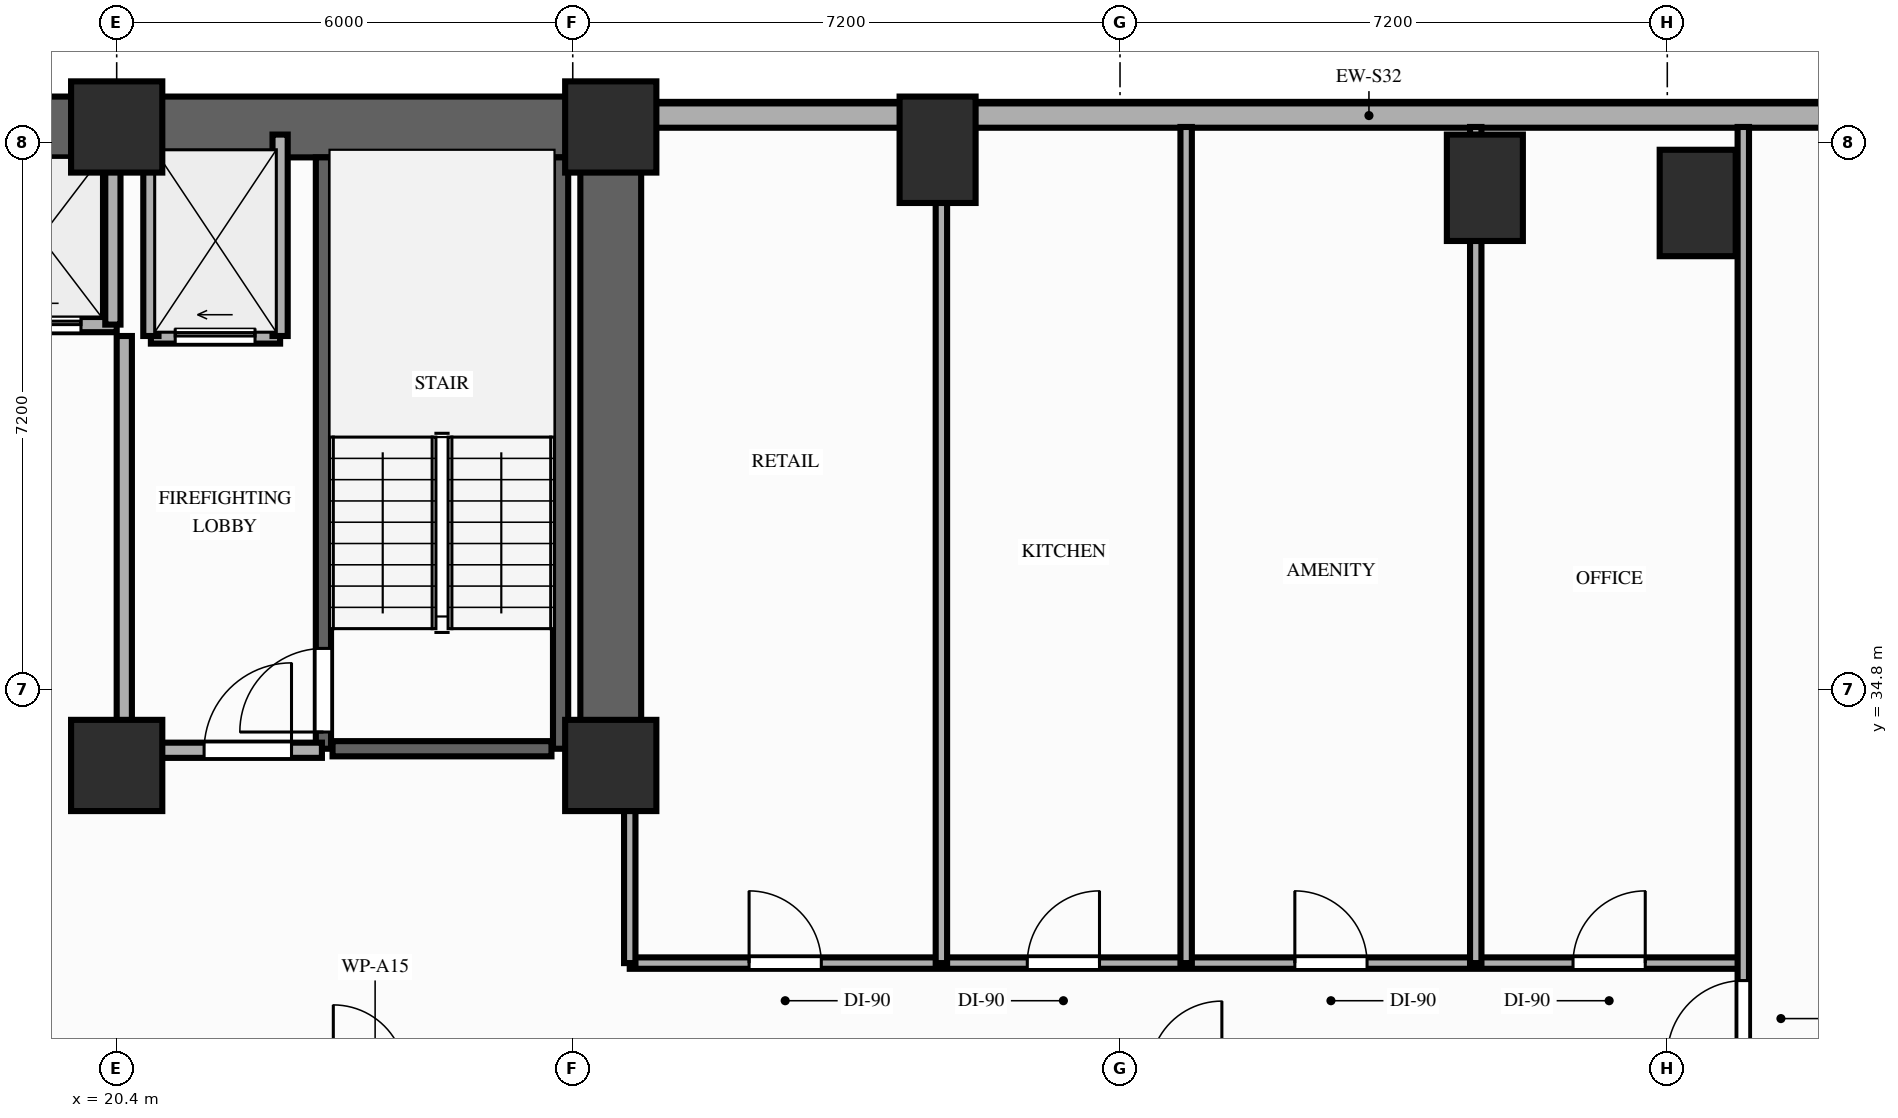
"""IFC4 building model, lengths in metres.
Left out: names, types, materials, properties, quantities, classifications, styles, units other than length and angle.
Written with IfcOpenShell. Run it as: python <this file> out.ifc"""

import sys

from ifc_helpers import new_model, si_unit, direction, frame, frame_2d, origin, origin_2d, place, context, subcontext, project, spatial, rectangle, extrude, element, fill, save


model = new_model("IFC4")
c1 = context("Model", 3, precision=1e-05, world=origin(), true_north=direction((0.0, 1.0)))
c2 = subcontext(c1, "Body", "Model", "MODEL_VIEW")
j1 = project(units=[si_unit("LENGTHUNIT", "METRE"), si_unit("PLANEANGLEUNIT", "RADIAN")], contexts=[c1])
p1 = place(None, origin())
s1 = spatial("IfcSite", under=j1, at=p1, CompositionType="ELEMENT")
p2 = place(p1, origin())
s2 = spatial("IfcBuilding", under=s1, at=p2, CompositionType="ELEMENT")
p3 = place(p2, frame((0.0, 0.0, 56.4)))
s3 = spatial("IfcBuildingStorey", under=s2, at=p3, CompositionType="ELEMENT", Elevation=56.4)
for number, where, z_axis, x_axis in (
    (1, (20.4, 33.8, 0.0), (0.0, 0.0, 1.0), (1.0, 0.0, 0.0)),
    (2, (26.9, 33.8, 0.0), (0.0, 0.0, 1.0), (1.0, 0.0, 0.0)),
    (3, (20.4, 42.2, 0.0), (0.0, 0.0, 1.0), (1.0, 0.0, 0.0)),
    (4, (26.9, 42.2, 0.0), (0.0, 0.0, 1.0), (1.0, 0.0, 0.0)),
):
    element("IfcColumn", number, at=place(p3, frame(where, z_axis=z_axis, x_axis=x_axis)), inside=s3, PredefinedType="COLUMN", context=c2, shape_type="SweptSolid", body=[
        extrude(rectangle(XDim=1.2, YDim=1.2, at=origin_2d()), origin(), (0.0, 0.0, 1.0), 3.2),
    ])
for number, where, z_axis, x_axis in (
    (5, (31.2, 41.9, 0.0), (0.0, 0.0, 1.0), (1.0, 0.0, 0.0)),
    (6, (38.4, 41.4, 0.0), (0.0, 0.0, 1.0), (1.0, 0.0, 0.0)),
    (7, (41.2, 41.2, 0.0), (0.0, 0.0, 1.0), (1.0, 0.0, 0.0)),
):
    element("IfcColumn", number, at=place(p3, frame(where, z_axis=z_axis, x_axis=x_axis)), inside=s3, PredefinedType="COLUMN", context=c2, shape_type="SweptSolid", body=[
        extrude(rectangle(XDim=1.0, YDim=1.4, at=origin_2d()), origin(), (0.0, 0.0, 1.0), 3.2),
    ])
p4 = place(p3, frame((46.4, 42.35, 0.0), z_axis=(0.0, 0.0, 1.0), x_axis=(-1.0, 0.0, 0.0)))
e8 = element("IfcWall", 8, at=p4, inside=s3, PredefinedType="STANDARD", context=c2, shape_type="SweptSolid", body=[
    extrude(rectangle(XDim=19.05, YDim=0.32, at=frame_2d((9.525, 0.0))), origin(), (0.0, 0.0, 1.0), 2.4),
])
p5 = place(p3, frame((6.45, 42.2, 0.0), z_axis=(0.0, 0.0, 1.0), x_axis=(1.0, 0.0, 0.0)))
e9 = element("IfcWall", 9, at=p5, inside=s3, PredefinedType="SHEAR", context=c2, shape_type="SweptSolid", body=[
    extrude(rectangle(XDim=20.45, YDim=0.8, at=frame_2d((10.225, 0.0))), origin(), (0.0, 0.0, 1.0), 3.02),
])
p6 = place(p3, frame((26.9, 33.8, 0.0), z_axis=(0.0, 0.0, 1.0), x_axis=(0.0, 1.0, 0.0)))
e10 = element("IfcWall", 10, at=p6, inside=s3, PredefinedType="SHEAR", context=c2, shape_type="SweptSolid", body=[
    extrude(rectangle(XDim=7.95, YDim=0.8, at=frame_2d((3.975, 0.0))), origin(), (0.0, 0.0, 1.0), 3.02),
])
p7 = place(p3, frame((23.12, 34.02, 0.0), z_axis=(0.0, 0.0, 1.0), x_axis=(0.0, 1.0, 0.0)))
e11 = element("IfcWall", 11, at=p7, inside=s3, PredefinedType="SHEAR", context=c2, shape_type="SweptSolid", body=[
    extrude(rectangle(XDim=7.78, YDim=0.2, at=frame_2d((3.89, 0.0))), origin(), (0.0, 0.0, 1.0), 3.02),
])
p8 = place(p7, frame((0.22, 0.0, 0.0)))
e12 = element("IfcOpeningElement", 12, at=p8, cuts=e11, PredefinedType="OPENING", context=c2, shape_type="SweptSolid", body=[
    extrude(rectangle(XDim=1.1, YDim=2.15, at=frame_2d((0.55, 1.075))), frame((0.0, 0.11, 0.0), z_axis=(0.0, -1.0, 0.0), x_axis=(1.0, 0.0, 0.0)), (0.0, 0.0, 1.0), 0.22),
])
p9 = place(p3, frame((26.24, 34.02, 0.0), z_axis=(0.0, 0.0, 1.0), x_axis=(0.0, 1.0, 0.0)))
e13 = element("IfcWall", 13, at=p9, inside=s3, PredefinedType="SHEAR", context=c2, shape_type="SweptSolid", body=[
    extrude(rectangle(XDim=7.78, YDim=0.2, at=frame_2d((3.89, 0.0))), origin(), (0.0, 0.0, 1.0), 3.02),
])
p10 = place(p3, frame((23.24, 34.02, 0.0), z_axis=(0.0, 0.0, 1.0), x_axis=(1.0, 0.0, 0.0)))
e14 = element("IfcWall", 14, at=p10, inside=s3, PredefinedType="SHEAR", context=c2, shape_type="SweptSolid", body=[
    extrude(rectangle(XDim=2.88, YDim=0.2, at=frame_2d((1.44, 0.0))), origin(), (0.0, 0.0, 1.0), 3.02),
])
p11 = place(p3, frame((20.85, 39.45, 0.0), z_axis=(0.0, 0.0, 1.0), x_axis=(1.0, 0.0, 0.0)))
e15 = element("IfcWall", 15, at=p11, inside=s3, PredefinedType="MOVABLE", context=c2, shape_type="SweptSolid", body=[
    extrude(rectangle(XDim=1.7, YDim=0.2, at=frame_2d((0.85, 0.0))), origin(), (0.0, 0.0, 1.0), 3.02),
])
p12 = place(p11, frame((0.32, 0.0, 0.0)))
e16 = element("IfcOpeningElement", 16, at=p12, cuts=e15, PredefinedType="OPENING", context=c2, shape_type="SweptSolid", body=[
    extrude(rectangle(XDim=1.05, YDim=2.15, at=frame_2d((0.525, 1.075))), frame((0.0, 0.11, 0.0), z_axis=(0.0, -1.0, 0.0), x_axis=(1.0, 0.0, 0.0)), (0.0, 0.0, 1.0), 0.22),
])
for number, where, z_axis, x_axis in (
    (17, (20.85, 39.45, 0.0), (0.0, 0.0, 1.0), (0.0, 1.0, 0.0)),
    (18, (22.55, 39.45, 0.0), (0.0, 0.0, 1.0), (0.0, 1.0, 0.0)),
):
    element("IfcWall", number, at=place(p3, frame(where, z_axis=z_axis, x_axis=x_axis)), inside=s3, PredefinedType="MOVABLE", context=c2, shape_type="SweptSolid", body=[
        extrude(rectangle(XDim=2.65, YDim=0.2, at=frame_2d((1.325, 0.0))), origin(), (0.0, 0.0, 1.0), 2.4),
    ])
p13 = place(p3, frame((20.5, 34.0, 0.0), z_axis=(0.0, 0.0, 1.0), x_axis=(0.0, 1.0, 0.0)))
e19 = element("IfcWall", 19, at=p13, inside=s3, PredefinedType="PARTITIONING", context=c2, shape_type="SweptSolid", body=[
    extrude(rectangle(XDim=5.45, YDim=0.2, at=frame_2d((2.725, 0.0))), origin(), (0.0, 0.0, 1.0), 2.4),
])
p14 = place(p3, frame((20.5, 34.0, 0.0), z_axis=(0.0, 0.0, 1.0), x_axis=(1.0, 0.0, 0.0)))
e20 = element("IfcWall", 20, at=p14, inside=s3, PredefinedType="PARTITIONING", context=c2, shape_type="SweptSolid", body=[
    extrude(rectangle(XDim=2.6, YDim=0.2, at=frame_2d((1.3, 0.0))), origin(), (0.0, 0.0, 1.0), 2.4),
])
p15 = place(p14, frame((1.05, 0.0, 0.0)))
e21 = element("IfcOpeningElement", 21, at=p15, cuts=e20, PredefinedType="OPENING", context=c2, shape_type="SweptSolid", body=[
    extrude(rectangle(XDim=1.15, YDim=2.15, at=frame_2d((0.575, 1.075))), frame((0.0, 0.11, 0.0), z_axis=(0.0, -1.0, 0.0), x_axis=(1.0, 0.0, 0.0)), (0.0, 0.0, 1.0), 0.22),
])
p16 = place(p3, frame((13.0, 39.6, 0.0), z_axis=(0.0, 0.0, 1.0), x_axis=(1.0, 0.0, 0.0)))
e22 = element("IfcWall", 22, at=p16, inside=s3, PredefinedType="MOVABLE", context=c2, shape_type="SweptSolid", body=[
    extrude(rectangle(XDim=7.4, YDim=0.2, at=frame_2d((3.7, 0.0))), origin(), (0.0, 0.0, 1.0), 3.02),
])
p17 = place(p16, frame((0.47, 0.0, 0.0)))
e23 = element("IfcOpeningElement", 23, at=p17, cuts=e22, PredefinedType="OPENING", context=c2, shape_type="SweptSolid", body=[
    extrude(rectangle(XDim=1.05, YDim=2.15, at=frame_2d((0.525, 1.075))), frame((0.0, 0.11, 0.0), z_axis=(0.0, -1.0, 0.0), x_axis=(1.0, 0.0, 0.0)), (0.0, 0.0, 1.0), 0.22),
])
p18 = place(p16, frame((2.28, 0.0, 0.0)))
e24 = element("IfcOpeningElement", 24, at=p18, cuts=e22, PredefinedType="OPENING", context=c2, shape_type="SweptSolid", body=[
    extrude(rectangle(XDim=1.05, YDim=2.15, at=frame_2d((0.525, 1.075))), frame((0.0, 0.11, 0.0), z_axis=(0.0, -1.0, 0.0), x_axis=(1.0, 0.0, 0.0)), (0.0, 0.0, 1.0), 0.22),
])
p19 = place(p16, frame((4.08, 0.0, 0.0)))
e25 = element("IfcOpeningElement", 25, at=p19, cuts=e22, PredefinedType="OPENING", context=c2, shape_type="SweptSolid", body=[
    extrude(rectangle(XDim=1.05, YDim=2.15, at=frame_2d((0.525, 1.075))), frame((0.0, 0.11, 0.0), z_axis=(0.0, -1.0, 0.0), x_axis=(1.0, 0.0, 0.0)), (0.0, 0.0, 1.0), 0.22),
])
p20 = place(p16, frame((5.88, 0.0, 0.0)))
e26 = element("IfcOpeningElement", 26, at=p20, cuts=e22, PredefinedType="OPENING", context=c2, shape_type="SweptSolid", body=[
    extrude(rectangle(XDim=1.05, YDim=2.15, at=frame_2d((0.525, 1.075))), frame((0.0, 0.11, 0.0), z_axis=(0.0, -1.0, 0.0), x_axis=(1.0, 0.0, 0.0)), (0.0, 0.0, 1.0), 0.22),
])
p21 = place(p3, frame((20.35, 39.6, 0.0), z_axis=(0.0, 0.0, 1.0), x_axis=(0.0, 1.0, 0.0)))
e27 = element("IfcWall", 27, at=p21, inside=s3, PredefinedType="MOVABLE", context=c2, shape_type="SweptSolid", body=[
    extrude(rectangle(XDim=2.18, YDim=0.2, at=frame_2d((1.09, 0.0))), origin(), (0.0, 0.0, 1.0), 3.02),
])
p22 = place(p3, frame((27.15, 31.2, 0.0), z_axis=(0.0, 0.0, 1.0), x_axis=(1.0, 0.0, 0.0)))
e28 = element("IfcWall", 28, at=p22, inside=s3, PredefinedType="PARTITIONING", context=c2, shape_type="SweptSolid", body=[
    extrude(rectangle(XDim=14.65, YDim=0.15, at=frame_2d((7.325, 0.0))), origin(), (0.0, 0.0, 1.0), 2.4),
])
p23 = place(p22, frame((1.57, 0.0, 0.0)))
e29 = element("IfcOpeningElement", 29, at=p23, cuts=e28, PredefinedType="OPENING", context=c2, shape_type="SweptSolid", body=[
    extrude(rectangle(XDim=0.95, YDim=2.15, at=frame_2d((0.475, 1.075))), frame((0.0, 0.085, 0.0), z_axis=(0.0, -1.0, 0.0), x_axis=(1.0, 0.0, 0.0)), (0.0, 0.0, 1.0), 0.17),
])
p24 = place(p22, frame((5.23, 0.0, 0.0)))
e30 = element("IfcOpeningElement", 30, at=p24, cuts=e28, PredefinedType="OPENING", context=c2, shape_type="SweptSolid", body=[
    extrude(rectangle(XDim=0.95, YDim=2.15, at=frame_2d((0.475, 1.075))), frame((0.0, 0.085, 0.0), z_axis=(0.0, -1.0, 0.0), x_axis=(1.0, 0.0, 0.0)), (0.0, 0.0, 1.0), 0.17),
])
p25 = place(p22, frame((8.75, 0.0, 0.0)))
e31 = element("IfcOpeningElement", 31, at=p25, cuts=e28, PredefinedType="OPENING", context=c2, shape_type="SweptSolid", body=[
    extrude(rectangle(XDim=0.95, YDim=2.15, at=frame_2d((0.475, 1.075))), frame((0.0, 0.085, 0.0), z_axis=(0.0, -1.0, 0.0), x_axis=(1.0, 0.0, 0.0)), (0.0, 0.0, 1.0), 0.17),
])
p26 = place(p22, frame((12.41, 0.0, 0.0)))
e32 = element("IfcOpeningElement", 32, at=p26, cuts=e28, PredefinedType="OPENING", context=c2, shape_type="SweptSolid", body=[
    extrude(rectangle(XDim=0.95, YDim=2.15, at=frame_2d((0.475, 1.075))), frame((0.0, 0.085, 0.0), z_axis=(0.0, -1.0, 0.0), x_axis=(1.0, 0.0, 0.0)), (0.0, 0.0, 1.0), 0.17),
])
p27 = place(p3, frame((27.15, 31.2, 0.0), z_axis=(0.0, 0.0, 1.0), x_axis=(0.0, 1.0, 0.0)))
e33 = element("IfcWall", 33, at=p27, inside=s3, PredefinedType="PARTITIONING", context=c2, shape_type="SweptSolid", body=[
    extrude(rectangle(XDim=2.48, YDim=0.15, at=frame_2d((1.24, 0.0))), origin(), (0.0, 0.0, 1.0), 2.4),
])
p28 = place(p3, frame((41.8, 26.75, 0.0), z_axis=(0.0, 0.0, 1.0), x_axis=(0.0, 1.0, 0.0)))
e34 = element("IfcWall", 34, at=p28, inside=s3, PredefinedType="PARTITIONING", context=c2, shape_type="SweptSolid", body=[
    extrude(rectangle(XDim=15.45, YDim=0.15, at=frame_2d((7.725, 0.0))), origin(), (0.0, 0.0, 1.0), 2.4),
])
p29 = place(p28, frame((3.22, 0.0, 0.0)))
e35 = element("IfcOpeningElement", 35, at=p29, cuts=e34, PredefinedType="OPENING", context=c2, shape_type="SweptSolid", body=[
    extrude(rectangle(XDim=1.0, YDim=2.15, at=frame_2d((0.5, 1.075))), frame((0.0, 0.085, 0.0), z_axis=(0.0, -1.0, 0.0), x_axis=(1.0, 0.0, 0.0)), (0.0, 0.0, 1.0), 0.17),
])
for number, where, z_axis, x_axis in (
    (36, (31.25, 31.2, 0.0), (0.0, 0.0, 1.0), (0.0, 1.0, 0.0)),
    (37, (34.47, 31.2, 0.0), (0.0, 0.0, 1.0), (0.0, 1.0, 0.0)),
    (38, (38.28, 31.2, 0.0), (0.0, 0.0, 1.0), (0.0, 1.0, 0.0)),
):
    element("IfcWall", number, at=place(p3, frame(where, z_axis=z_axis, x_axis=x_axis)), inside=s3, PredefinedType="PARTITIONING", context=c2, shape_type="SweptSolid", body=[
        extrude(rectangle(XDim=11.0, YDim=0.15, at=frame_2d((5.5, 0.0))), origin(), (0.0, 0.0, 1.0), 2.4),
    ])
p30 = place(p8, origin())
e39 = element("IfcDoor", 39, at=p30, inside=s3, OperationType="SINGLE_SWING_LEFT", PredefinedType="DOOR", context=c2, shape_type="SweptSolid", body=[
    extrude(rectangle(XDim=1.1, YDim=2.15, at=frame_2d((0.55, 1.075))), frame((0.0, 0.025, 0.0), z_axis=(0.0, -1.0, 0.0), x_axis=(1.0, 0.0, 0.0)), (0.0, 0.0, 1.0), 0.05),
])
fill(e12, e39)
p31 = place(p12, origin())
e40 = element("IfcDoor", 40, at=p31, inside=s3, OperationType="SLIDING_TO_LEFT", PredefinedType="DOOR", context=c2, shape_type="SweptSolid", body=[
    extrude(rectangle(XDim=1.05, YDim=2.15, at=frame_2d((0.525, 1.075))), frame((0.0, 0.025, 0.0), z_axis=(0.0, -1.0, 0.0), x_axis=(1.0, 0.0, 0.0)), (0.0, 0.0, 1.0), 0.05),
])
fill(e16, e40)
p32 = place(p15, origin())
e41 = element("IfcDoor", 41, at=p32, inside=s3, OperationType="SINGLE_SWING_RIGHT", PredefinedType="DOOR", context=c2, shape_type="SweptSolid", body=[
    extrude(rectangle(XDim=1.15, YDim=2.15, at=frame_2d((0.575, 1.075))), frame((0.0, 0.025, 0.0), z_axis=(0.0, -1.0, 0.0), x_axis=(1.0, 0.0, 0.0)), (0.0, 0.0, 1.0), 0.05),
])
fill(e21, e41)
p33 = place(p20, origin())
e42 = element("IfcDoor", 42, at=p33, inside=s3, OperationType="SLIDING_TO_LEFT", PredefinedType="DOOR", context=c2, shape_type="SweptSolid", body=[
    extrude(rectangle(XDim=1.05, YDim=2.15, at=frame_2d((0.525, 1.075))), frame((0.0, 0.025, 0.0), z_axis=(0.0, -1.0, 0.0), x_axis=(1.0, 0.0, 0.0)), (0.0, 0.0, 1.0), 0.05),
])
fill(e26, e42)
p34 = place(p29, origin())
e43 = element("IfcDoor", 43, at=p34, inside=s3, OperationType="SINGLE_SWING_LEFT", PredefinedType="DOOR", context=c2, shape_type="SweptSolid", body=[
    extrude(rectangle(XDim=1.0, YDim=2.15, at=frame_2d((0.5, 1.075))), frame((0.0, 0.025, 0.0), z_axis=(0.0, -1.0, 0.0), x_axis=(1.0, 0.0, 0.0)), (0.0, 0.0, 1.0), 0.05),
])
fill(e35, e43)
p35 = place(p23, origin())
e44 = element("IfcDoor", 44, at=p35, inside=s3, OperationType="SINGLE_SWING_LEFT", PredefinedType="DOOR", context=c2, shape_type="SweptSolid", body=[
    extrude(rectangle(XDim=0.95, YDim=2.15, at=frame_2d((0.475, 1.075))), frame((0.0, 0.025, 0.0), z_axis=(0.0, -1.0, 0.0), x_axis=(1.0, 0.0, 0.0)), (0.0, 0.0, 1.0), 0.05),
])
fill(e29, e44)
p36 = place(p24, origin())
e45 = element("IfcDoor", 45, at=p36, inside=s3, OperationType="SINGLE_SWING_RIGHT", PredefinedType="DOOR", context=c2, shape_type="SweptSolid", body=[
    extrude(rectangle(XDim=0.95, YDim=2.15, at=frame_2d((0.475, 1.075))), frame((0.0, 0.025, 0.0), z_axis=(0.0, -1.0, 0.0), x_axis=(1.0, 0.0, 0.0)), (0.0, 0.0, 1.0), 0.05),
])
fill(e30, e45)
p37 = place(p25, origin())
e46 = element("IfcDoor", 46, at=p37, inside=s3, OperationType="SINGLE_SWING_LEFT", PredefinedType="DOOR", context=c2, shape_type="SweptSolid", body=[
    extrude(rectangle(XDim=0.95, YDim=2.15, at=frame_2d((0.475, 1.075))), frame((0.0, 0.025, 0.0), z_axis=(0.0, -1.0, 0.0), x_axis=(1.0, 0.0, 0.0)), (0.0, 0.0, 1.0), 0.05),
])
fill(e31, e46)
p38 = place(p26, origin())
e47 = element("IfcDoor", 47, at=p38, inside=s3, OperationType="SINGLE_SWING_RIGHT", PredefinedType="DOOR", context=c2, shape_type="SweptSolid", body=[
    extrude(rectangle(XDim=0.95, YDim=2.15, at=frame_2d((0.475, 1.075))), frame((0.0, 0.025, 0.0), z_axis=(0.0, -1.0, 0.0), x_axis=(1.0, 0.0, 0.0)), (0.0, 0.0, 1.0), 0.05),
])
fill(e32, e47)
save(model, sys.argv[1])
